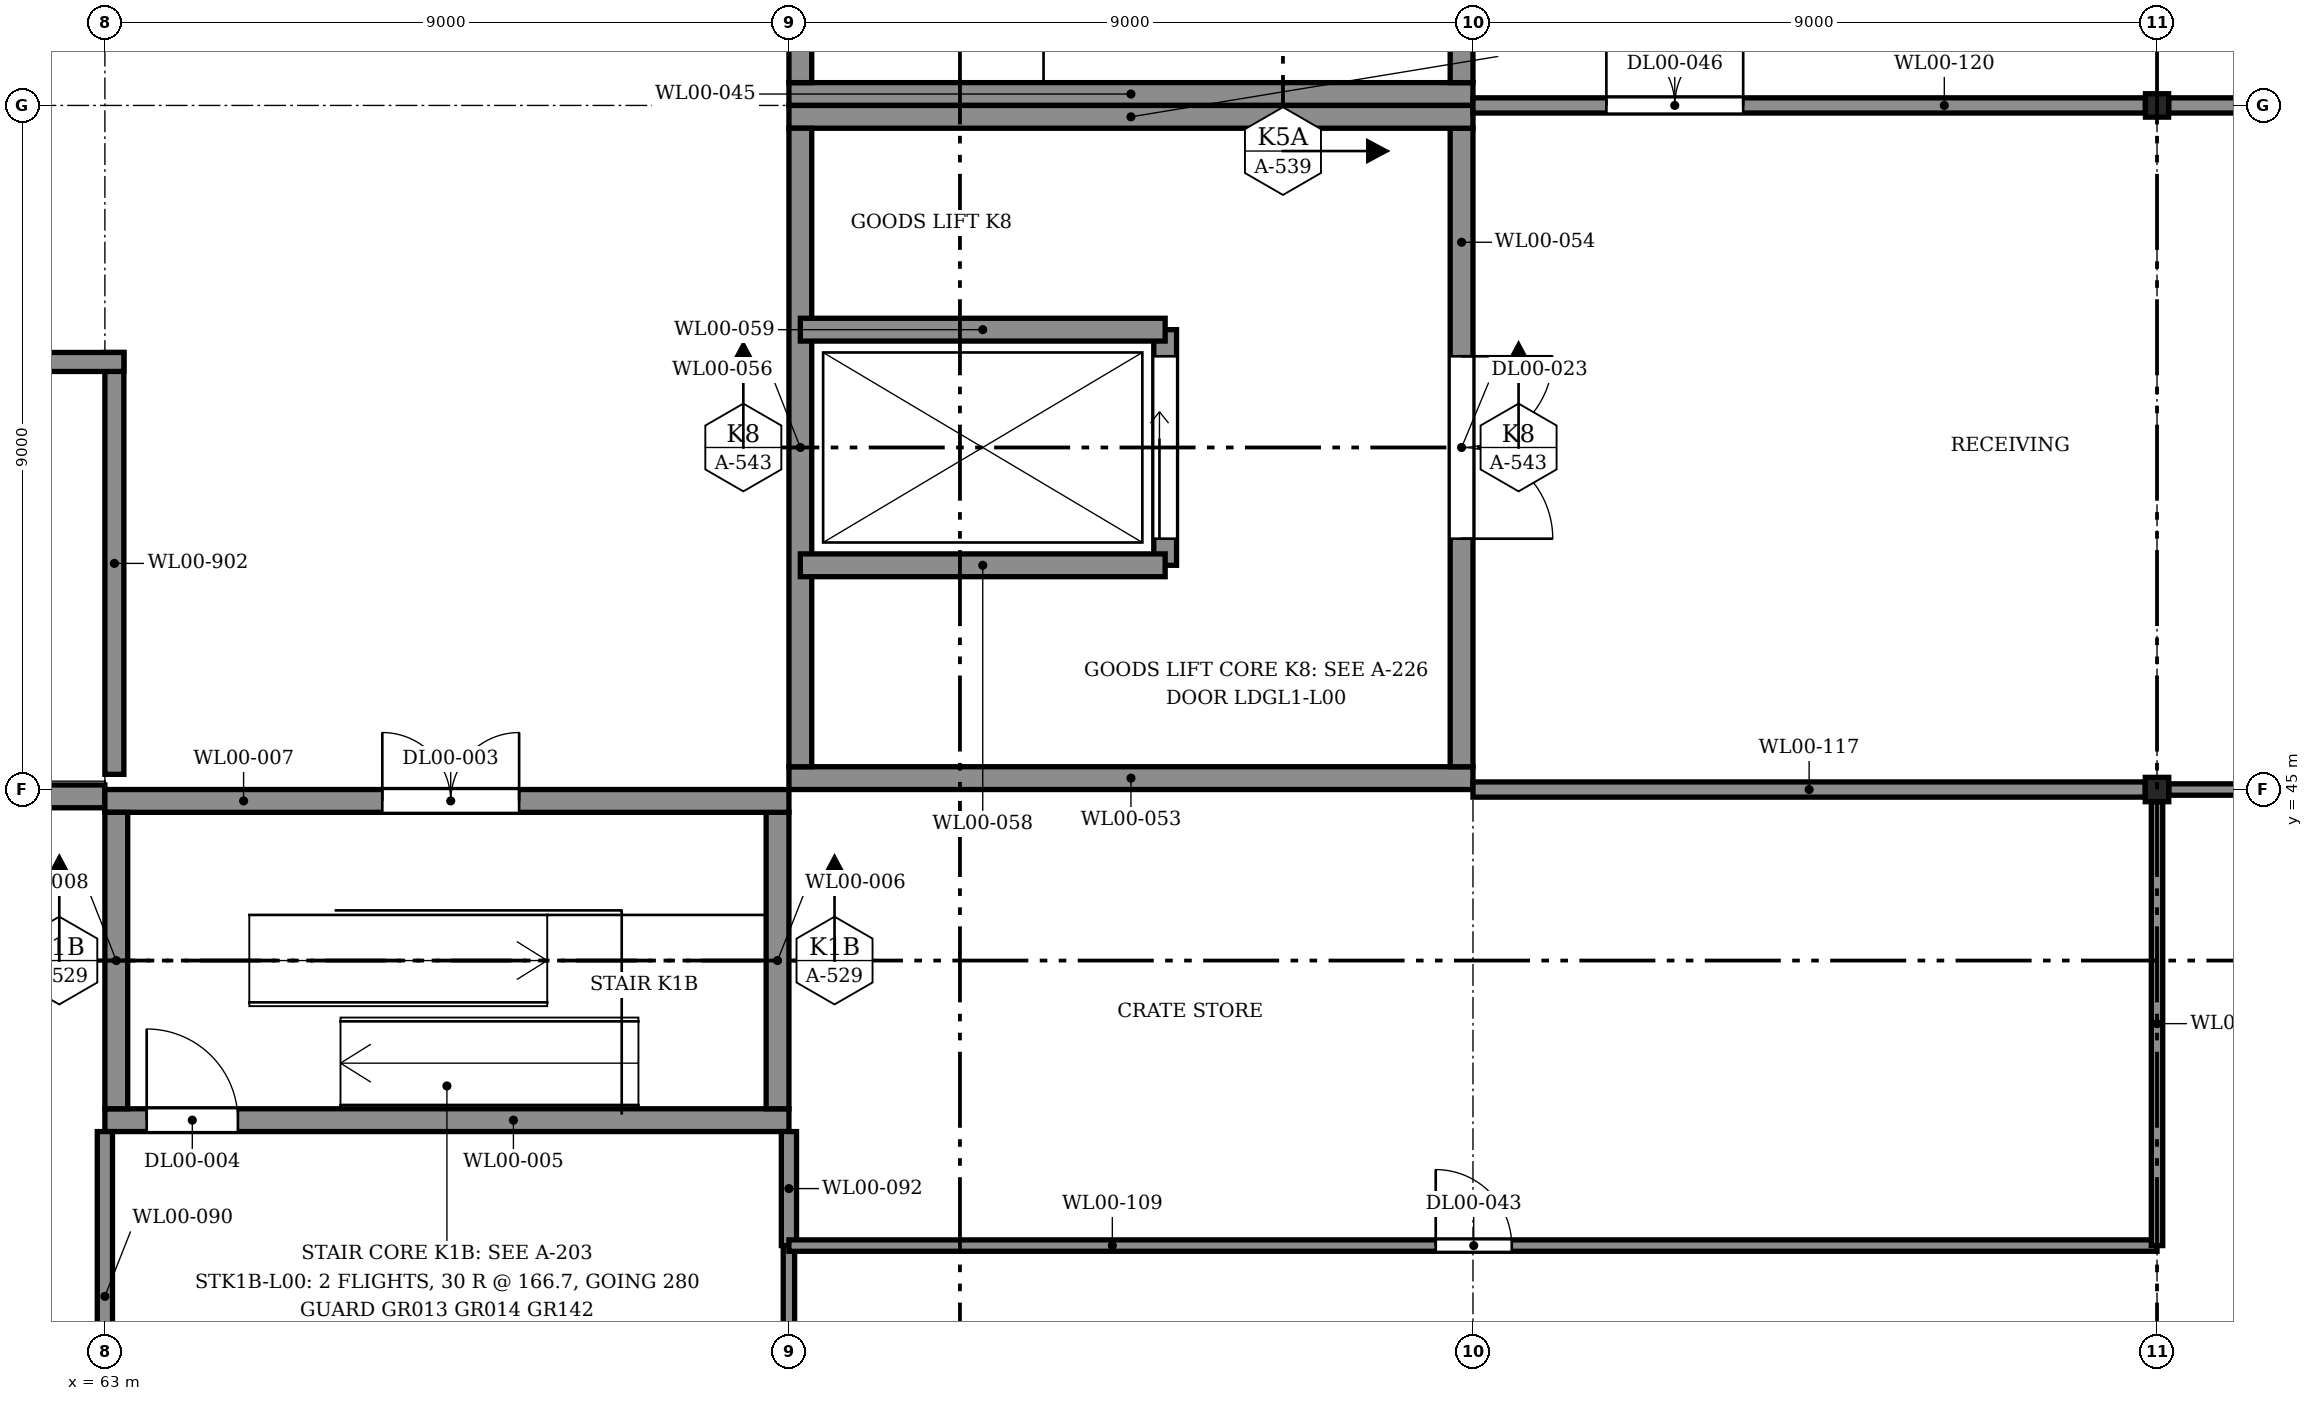
"""IFC4 building model, lengths in metres.
Left out: names, types, materials, properties, quantities, classifications, styles, units other than length and angle.
Written with IfcOpenShell. Run it as: python <this file> out.ifc"""

import sys

from ifc_helpers import new_model, si_unit, direction, frame, frame_2d, origin, origin_2d, place, context, subcontext, project, spatial, rectangle, i_section, extrude, element, fill, save


model = new_model("IFC4")
c1 = context("Model", 3, precision=1e-05, world=origin(), true_north=direction((0.0, 1.0)))
c2 = subcontext(c1, "Body", "Model", "MODEL_VIEW")
j1 = project(units=[si_unit("LENGTHUNIT", "METRE"), si_unit("PLANEANGLEUNIT", "RADIAN")], contexts=[c1])
p1 = place(None, origin())
s1 = spatial("IfcSite", under=j1, at=p1, CompositionType="ELEMENT")
p2 = place(p1, origin())
s2 = spatial("IfcBuilding", under=s1, at=p2, CompositionType="ELEMENT")
p3 = place(p2, origin())
s3 = spatial("IfcBuildingStorey", under=s2, at=p3, CompositionType="ELEMENT", Elevation=0.0)
p4 = place(p3, frame((90.0, 45.0, 0.0), z_axis=(0.0, 0.0, 1.0), x_axis=(1.0, 0.0, 0.0)))
e1 = element("IfcColumn", 1, at=p4, inside=s3, PredefinedType="COLUMN", context=c2, shape_type="SweptSolid", body=[
    extrude(i_section(OverallWidth=0.309, OverallDepth=0.321, WebThickness=0.014, FlangeThickness=0.022, FilletRadius=0.017, at=origin_2d()), origin(), (0.0, 0.0, 1.0), 5.0),
])
p5 = place(p3, frame((90.0, 54.0, 0.0), z_axis=(0.0, 0.0, 1.0), x_axis=(1.0, 0.0, 0.0)))
e2 = element("IfcColumn", 2, at=p5, inside=s3, PredefinedType="COLUMN", context=c2, shape_type="SweptSolid", body=[
    extrude(i_section(OverallWidth=0.305, OverallDepth=0.308, WebThickness=0.01, FlangeThickness=0.015, FilletRadius=0.017, at=origin_2d()), origin(), (0.0, 0.0, 1.0), 5.0),
])
p6 = place(p3, frame((54.25, 44.91, 0.0), z_axis=(0.0, 0.0, 1.0), x_axis=(1.0, 0.0, 0.0)))
e3 = element("IfcWall", 3, at=p6, inside=s3, PredefinedType="SOLIDWALL", context=c2, shape_type="SweptSolid", body=[
    extrude(rectangle(XDim=8.75, YDim=0.3, at=frame_2d((4.375, 0.0))), origin(), (0.0, 0.0, 1.0), 4.378),
])
p7 = place(p3, frame((63.125, 45.2, -0.7), z_axis=(0.0, 0.0, 1.0), x_axis=(0.0, 1.0, 0.0)))
e4 = element("IfcWall", 4, at=p7, inside=s3, PredefinedType="SOLIDWALL", context=c2, shape_type="SweptSolid", body=[
    extrude(rectangle(XDim=5.55, YDim=0.25, at=frame_2d((2.775, 0.0))), origin(), (0.0, 0.0, 1.0), 0.7),
])
p8 = place(p3, frame((50.7, 50.625, -0.7), z_axis=(0.0, 0.0, 1.0), x_axis=(1.0, 0.0, 0.0)))
e5 = element("IfcWall", 5, at=p8, inside=s3, PredefinedType="SOLIDWALL", context=c2, shape_type="SweptSolid", body=[
    extrude(rectangle(XDim=12.55, YDim=0.25, at=frame_2d((6.275, 0.0))), origin(), (0.0, 0.0, 1.0), 0.7),
])
p9 = place(p3, frame((63.0, 40.65, 0.0), z_axis=(0.0, 0.0, 1.0), x_axis=(1.0, 0.0, 0.0)))
e6 = element("IfcWall", 6, at=p9, inside=s3, PredefinedType="SOLIDWALL", context=c2, shape_type="SweptSolid", body=[
    extrude(rectangle(XDim=9.0, YDim=0.3, at=frame_2d((4.5, 0.0))), origin(), (0.0, 0.0, 1.0), 5.0),
])
p10 = place(p9, frame((0.55, 0.0, 0.0)))
e7 = element("IfcOpeningElement", 7, at=p10, cuts=e6, PredefinedType="OPENING", context=c2, shape_type="SweptSolid", body=[
    extrude(rectangle(XDim=1.2, YDim=2.1, at=frame_2d((0.6, 1.05))), frame((0.0, 0.16, 0.0), z_axis=(0.0, -1.0, 0.0), x_axis=(1.0, 0.0, 0.0)), (0.0, 0.0, 1.0), 0.32),
])
p11 = place(p3, frame((71.85, 40.8, 0.0), z_axis=(0.0, 0.0, 1.0), x_axis=(0.0, 1.0, 0.0)))
e8 = element("IfcWall", 8, at=p11, inside=s3, PredefinedType="SOLIDWALL", context=c2, shape_type="SweptSolid", body=[
    extrude(rectangle(XDim=3.9, YDim=0.3, at=frame_2d((1.95, 0.0))), origin(), (0.0, 0.0, 1.0), 5.0),
])
p12 = place(p3, frame((63.0, 44.85, 0.0), z_axis=(0.0, 0.0, 1.0), x_axis=(1.0, 0.0, 0.0)))
e9 = element("IfcWall", 9, at=p12, inside=s3, PredefinedType="SOLIDWALL", context=c2, shape_type="SweptSolid", body=[
    extrude(rectangle(XDim=9.0, YDim=0.3, at=frame_2d((4.5, 0.0))), origin(), (0.0, 0.0, 1.0), 5.0),
])
p13 = place(p12, frame((3.65, 0.0, 0.0)))
e10 = element("IfcOpeningElement", 10, at=p13, cuts=e9, PredefinedType="OPENING", context=c2, shape_type="SweptSolid", body=[
    extrude(rectangle(XDim=1.8, YDim=2.1, at=frame_2d((0.9, 1.05))), frame((0.0, 0.16, 0.0), z_axis=(0.0, -1.0, 0.0), x_axis=(1.0, 0.0, 0.0)), (0.0, 0.0, 1.0), 0.32),
])
p14 = place(p3, frame((63.15, 40.8, 0.0), z_axis=(0.0, 0.0, 1.0), x_axis=(0.0, 1.0, 0.0)))
e11 = element("IfcWall", 11, at=p14, inside=s3, PredefinedType="SOLIDWALL", context=c2, shape_type="SweptSolid", body=[
    extrude(rectangle(XDim=3.9, YDim=0.3, at=frame_2d((1.95, 0.0))), origin(), (0.0, 0.0, 1.0), 5.0),
])
p15 = place(p3, frame((72.0, 54.15, 0.0), z_axis=(0.0, 0.0, 1.0), x_axis=(1.0, 0.0, 0.0)))
e12 = element("IfcWall", 12, at=p15, inside=s3, PredefinedType="SOLIDWALL", context=c2, shape_type="SweptSolid", body=[
    extrude(rectangle(XDim=9.0, YDim=0.3, at=frame_2d((4.5, 0.0))), origin(), (0.0, 0.0, 1.0), 5.0),
])
for number, where, z_axis, x_axis in (
    (13, (80.85, 54.3, 0.0), (0.0, 0.0, 1.0), (0.0, 1.0, 0.0)),
    (14, (72.15, 54.3, 0.0), (0.0, 0.0, 1.0), (0.0, 1.0, 0.0)),
):
    element("IfcWall", number, at=place(p3, frame(where, z_axis=z_axis, x_axis=x_axis)), inside=s3, PredefinedType="SOLIDWALL", context=c2, shape_type="SweptSolid", body=[
        extrude(rectangle(XDim=8.4, YDim=0.3, at=frame_2d((4.2, 0.0))), origin(), (0.0, 0.0, 1.0), 5.0),
    ])
p16 = place(p3, frame((72.0, 45.15, 0.0), z_axis=(0.0, 0.0, 1.0), x_axis=(1.0, 0.0, 0.0)))
e15 = element("IfcWall", 15, at=p16, inside=s3, PredefinedType="SOLIDWALL", context=c2, shape_type="SweptSolid", body=[
    extrude(rectangle(XDim=9.0, YDim=0.3, at=frame_2d((4.5, 0.0))), origin(), (0.0, 0.0, 1.0), 5.0),
])
p17 = place(p3, frame((80.85, 45.3, 0.0), z_axis=(0.0, 0.0, 1.0), x_axis=(0.0, 1.0, 0.0)))
e16 = element("IfcWall", 16, at=p17, inside=s3, PredefinedType="SOLIDWALL", context=c2, shape_type="SweptSolid", body=[
    extrude(rectangle(XDim=8.4, YDim=0.3, at=frame_2d((4.2, 0.0))), origin(), (0.0, 0.0, 1.0), 5.0),
])
p18 = place(p17, frame((3.0, 0.0, 0.0)))
e17 = element("IfcOpeningElement", 17, at=p18, cuts=e16, PredefinedType="OPENING", context=c2, shape_type="SweptSolid", body=[
    extrude(rectangle(XDim=2.4, YDim=2.4, at=frame_2d((1.2, 1.2))), frame((0.0, 0.16, 0.0), z_axis=(0.0, -1.0, 0.0), x_axis=(1.0, 0.0, 0.0)), (0.0, 0.0, 1.0), 0.32),
])
p19 = place(p3, frame((72.0, 53.85, 0.0), z_axis=(0.0, 0.0, 1.0), x_axis=(1.0, 0.0, 0.0)))
e18 = element("IfcWall", 18, at=p19, inside=s3, PredefinedType="SOLIDWALL", context=c2, shape_type="SweptSolid", body=[
    extrude(rectangle(XDim=9.0, YDim=0.3, at=frame_2d((4.5, 0.0))), origin(), (0.0, 0.0, 1.0), 5.0),
])
p20 = place(p3, frame((72.15, 45.3, 0.0), z_axis=(0.0, 0.0, 1.0), x_axis=(0.0, 1.0, 0.0)))
e19 = element("IfcWall", 19, at=p20, inside=s3, PredefinedType="SOLIDWALL", context=c2, shape_type="SweptSolid", body=[
    extrude(rectangle(XDim=8.4, YDim=0.3, at=frame_2d((4.2, 0.0))), origin(), (0.0, 0.0, 1.0), 5.0),
])
p21 = place(p3, frame((76.95, 47.95, 0.0), z_axis=(0.0, 0.0, 1.0), x_axis=(0.0, 1.0, 0.0)))
e20 = element("IfcWall", 20, at=p21, inside=s3, PredefinedType="SOLIDWALL", context=c2, shape_type="SweptSolid", body=[
    extrude(rectangle(XDim=3.1, YDim=0.3, at=frame_2d((1.55, 0.0))), origin(), (0.0, 0.0, 1.0), 5.0),
])
p22 = place(p21, frame((0.35, 0.0, 0.0)))
e21 = element("IfcOpeningElement", 21, at=p22, cuts=e20, PredefinedType="OPENING", context=c2, shape_type="SweptSolid", body=[
    extrude(rectangle(XDim=2.4, YDim=2.4, at=frame_2d((1.2, 1.2))), frame((0.0, 0.16, 0.0), z_axis=(0.0, -1.0, 0.0), x_axis=(1.0, 0.0, 0.0)), (0.0, 0.0, 1.0), 0.32),
])
for number, where, z_axis, x_axis in (
    (22, (72.15, 47.95, 0.0), (0.0, 0.0, 1.0), (1.0, 0.0, 0.0)),
    (23, (72.15, 51.05, 0.0), (0.0, 0.0, 1.0), (1.0, 0.0, 0.0)),
):
    element("IfcWall", number, at=place(p3, frame(where, z_axis=z_axis, x_axis=x_axis)), inside=s3, PredefinedType="SOLIDWALL", context=c2, shape_type="SweptSolid", body=[
        extrude(rectangle(XDim=4.8, YDim=0.3, at=frame_2d((2.4, 0.0))), origin(), (0.0, 0.0, 1.0), 5.0),
    ])
p23 = place(p3, frame((63.0, 36.164, 0.0), z_axis=(0.0, 0.0, 1.0), x_axis=(0.0, 1.0, 0.0)))
e24 = element("IfcWall", 24, at=p23, inside=s3, PredefinedType="PARTITIONING", context=c2, shape_type="SweptSolid", body=[
    extrude(rectangle(XDim=4.336, YDim=0.2, at=frame_2d((2.168, 0.0))), origin(), (0.0, 0.0, 1.0), 4.302),
])
p24 = place(p3, frame((72.0, 36.0, 0.0), z_axis=(0.0, 0.0, 1.0), x_axis=(0.0, 1.0, 0.0)))
e25 = element("IfcWall", 25, at=p24, inside=s3, PredefinedType="PARTITIONING", context=c2, shape_type="SweptSolid", body=[
    extrude(rectangle(XDim=3.0, YDim=0.15, at=frame_2d((1.5, 0.0))), origin(), (0.0, 0.0, 1.0), 3.958),
])
p25 = place(p3, frame((72.0, 39.0, 0.0), z_axis=(0.0, 0.0, 1.0), x_axis=(0.0, 1.0, 0.0)))
e26 = element("IfcWall", 26, at=p25, inside=s3, PredefinedType="PARTITIONING", context=c2, shape_type="SweptSolid", body=[
    extrude(rectangle(XDim=1.5, YDim=0.2, at=frame_2d((0.75, 0.0))), origin(), (0.0, 0.0, 1.0), 3.958),
])
p26 = place(p3, frame((72.0, 39.0, 0.0), z_axis=(0.0, 0.0, 1.0), x_axis=(1.0, 0.0, 0.0)))
e27 = element("IfcWall", 27, at=p26, inside=s3, PredefinedType="PARTITIONING", context=c2, shape_type="SweptSolid", body=[
    extrude(rectangle(XDim=18.0, YDim=0.15, at=frame_2d((9.0, 0.0))), origin(), (0.0, 0.0, 1.0), 3.958),
])
p27 = place(p26, frame((8.51, 0.0, 0.0)))
e28 = element("IfcOpeningElement", 28, at=p27, cuts=e27, PredefinedType="OPENING", context=c2, shape_type="SweptSolid", body=[
    extrude(rectangle(XDim=1.0, YDim=2.1, at=frame_2d((0.5, 1.05))), frame((0.0, 0.085, 0.0), z_axis=(0.0, -1.0, 0.0), x_axis=(1.0, 0.0, 0.0)), (0.0, 0.0, 1.0), 0.17),
])
p28 = place(p3, frame((90.0, 39.0, 0.0), z_axis=(0.0, 0.0, 1.0), x_axis=(0.0, 1.0, 0.0)))
e29 = element("IfcWall", 29, at=p28, inside=s3, PredefinedType="PARTITIONING", context=c2, shape_type="SweptSolid", body=[
    extrude(rectangle(XDim=5.84, YDim=0.15, at=frame_2d((2.92, 0.0))), origin(), (0.0, 0.0, 1.0), 3.958),
])
p29 = place(p3, frame((90.155, 45.0, 0.0), z_axis=(0.0, 0.0, 1.0), x_axis=(1.0, 0.0, 0.0)))
e30 = element("IfcWall", 30, at=p29, inside=s3, PredefinedType="PARTITIONING", context=c2, shape_type="SweptSolid", body=[
    extrude(rectangle(XDim=8.691, YDim=0.15, at=frame_2d((4.345, 0.0))), origin(), (0.0, 0.0, 1.0), 3.958),
])
p30 = place(p29, frame((3.85, 0.0, 0.0)))
e31 = element("IfcOpeningElement", 31, at=p30, cuts=e30, PredefinedType="OPENING", context=c2, shape_type="SweptSolid", body=[
    extrude(rectangle(XDim=1.0, YDim=2.1, at=frame_2d((0.5, 1.05))), frame((0.0, 0.085, 0.0), z_axis=(0.0, -1.0, 0.0), x_axis=(1.0, 0.0, 0.0)), (0.0, 0.0, 1.0), 0.17),
])
p31 = place(p3, frame((81.0, 45.0, 0.0), z_axis=(0.0, 0.0, 1.0), x_axis=(1.0, 0.0, 0.0)))
e32 = element("IfcWall", 32, at=p31, inside=s3, PredefinedType="PARTITIONING", context=c2, shape_type="SweptSolid", body=[
    extrude(rectangle(XDim=8.845, YDim=0.2, at=frame_2d((4.423, 0.0))), origin(), (0.0, 0.0, 1.0), 3.958),
])
p32 = place(p3, frame((81.0, 54.0, 0.0), z_axis=(0.0, 0.0, 1.0), x_axis=(1.0, 0.0, 0.0)))
e33 = element("IfcWall", 33, at=p32, inside=s3, PredefinedType="PARTITIONING", context=c2, shape_type="SweptSolid", body=[
    extrude(rectangle(XDim=8.847, YDim=0.2, at=frame_2d((4.424, 0.0))), origin(), (0.0, 0.0, 1.0), 3.958),
])
p33 = place(p32, frame((1.755, 0.0, 0.0)))
e34 = element("IfcOpeningElement", 34, at=p33, cuts=e33, PredefinedType="OPENING", context=c2, shape_type="SweptSolid", body=[
    extrude(rectangle(XDim=1.8, YDim=2.1, at=frame_2d((0.9, 1.05))), frame((0.0, 0.11, 0.0), z_axis=(0.0, -1.0, 0.0), x_axis=(1.0, 0.0, 0.0)), (0.0, 0.0, 1.0), 0.22),
])
p34 = place(p3, frame((90.153, 54.0, 0.0), z_axis=(0.0, 0.0, 1.0), x_axis=(1.0, 0.0, 0.0)))
e35 = element("IfcWall", 35, at=p34, inside=s3, PredefinedType="PARTITIONING", context=c2, shape_type="SweptSolid", body=[
    extrude(rectangle(XDim=8.847, YDim=0.2, at=frame_2d((4.424, 0.0))), origin(), (0.0, 0.0, 1.0), 3.958),
])
p35 = place(p34, frame((3.55, 0.0, 0.0)))
e36 = element("IfcOpeningElement", 36, at=p35, cuts=e35, PredefinedType="OPENING", context=c2, shape_type="SweptSolid", body=[
    extrude(rectangle(XDim=1.8, YDim=2.1, at=frame_2d((0.9, 1.05))), frame((0.0, 0.11, 0.0), z_axis=(0.0, -1.0, 0.0), x_axis=(1.0, 0.0, 0.0)), (0.0, 0.0, 1.0), 0.22),
])
p36 = place(p13, origin())
e37 = element("IfcDoor", 37, at=p36, inside=s3, OperationType="DOUBLE_DOOR_SINGLE_SWING", PredefinedType="DOOR", context=c2, shape_type="SweptSolid", body=[
    extrude(rectangle(XDim=1.8, YDim=2.1, at=frame_2d((0.9, 1.05))), frame((0.0, 0.025, 0.0), z_axis=(0.0, -1.0, 0.0), x_axis=(1.0, 0.0, 0.0)), (0.0, 0.0, 1.0), 0.05),
])
fill(e10, e37)
p37 = place(p10, origin())
e38 = element("IfcDoor", 38, at=p37, inside=s3, OperationType="SINGLE_SWING_RIGHT", PredefinedType="DOOR", context=c2, shape_type="SweptSolid", body=[
    extrude(rectangle(XDim=1.2, YDim=2.1, at=frame_2d((0.6, 1.05))), frame((0.0, 0.025, 0.0), z_axis=(0.0, -1.0, 0.0), x_axis=(1.0, 0.0, 0.0)), (0.0, 0.0, 1.0), 0.05),
])
fill(e7, e38)
p38 = place(p22, origin())
e39 = element("IfcDoor", 39, at=p38, inside=s3, OperationType="DOUBLE_DOOR_SLIDING", PredefinedType="DOOR", context=c2, shape_type="SweptSolid", body=[
    extrude(rectangle(XDim=2.4, YDim=2.4, at=frame_2d((1.2, 1.2))), frame((0.0, 0.025, 0.0), z_axis=(0.0, -1.0, 0.0), x_axis=(1.0, 0.0, 0.0)), (0.0, 0.0, 1.0), 0.05),
])
fill(e21, e39)
p39 = place(p18, frame((2.4, 0.0, 0.0), z_axis=(0.0, 0.0, 1.0), x_axis=(-1.0, 0.0, 0.0)))
e40 = element("IfcDoor", 40, at=p39, inside=s3, OperationType="DOUBLE_DOOR_SINGLE_SWING", PredefinedType="DOOR", context=c2, shape_type="SweptSolid", body=[
    extrude(rectangle(XDim=2.4, YDim=2.4, at=frame_2d((1.2, 1.2))), frame((0.0, 0.025, 0.0), z_axis=(0.0, -1.0, 0.0), x_axis=(1.0, 0.0, 0.0)), (0.0, 0.0, 1.0), 0.05),
])
fill(e17, e40)
p40 = place(p27, origin())
e41 = element("IfcDoor", 41, at=p40, inside=s3, OperationType="SINGLE_SWING_RIGHT", PredefinedType="DOOR", context=c2, shape_type="SweptSolid", body=[
    extrude(rectangle(XDim=1.0, YDim=2.1, at=frame_2d((0.5, 1.05))), frame((0.0, 0.025, 0.0), z_axis=(0.0, -1.0, 0.0), x_axis=(1.0, 0.0, 0.0)), (0.0, 0.0, 1.0), 0.05),
])
fill(e28, e41)
p41 = place(p33, origin())
e42 = element("IfcDoor", 42, at=p41, inside=s3, OperationType="DOUBLE_DOOR_SINGLE_SWING", PredefinedType="DOOR", context=c2, shape_type="SweptSolid", body=[
    extrude(rectangle(XDim=1.8, YDim=2.1, at=frame_2d((0.9, 1.05))), frame((0.0, 0.025, 0.0), z_axis=(0.0, -1.0, 0.0), x_axis=(1.0, 0.0, 0.0)), (0.0, 0.0, 1.0), 0.05),
])
fill(e34, e42)
save(model, sys.argv[1])
